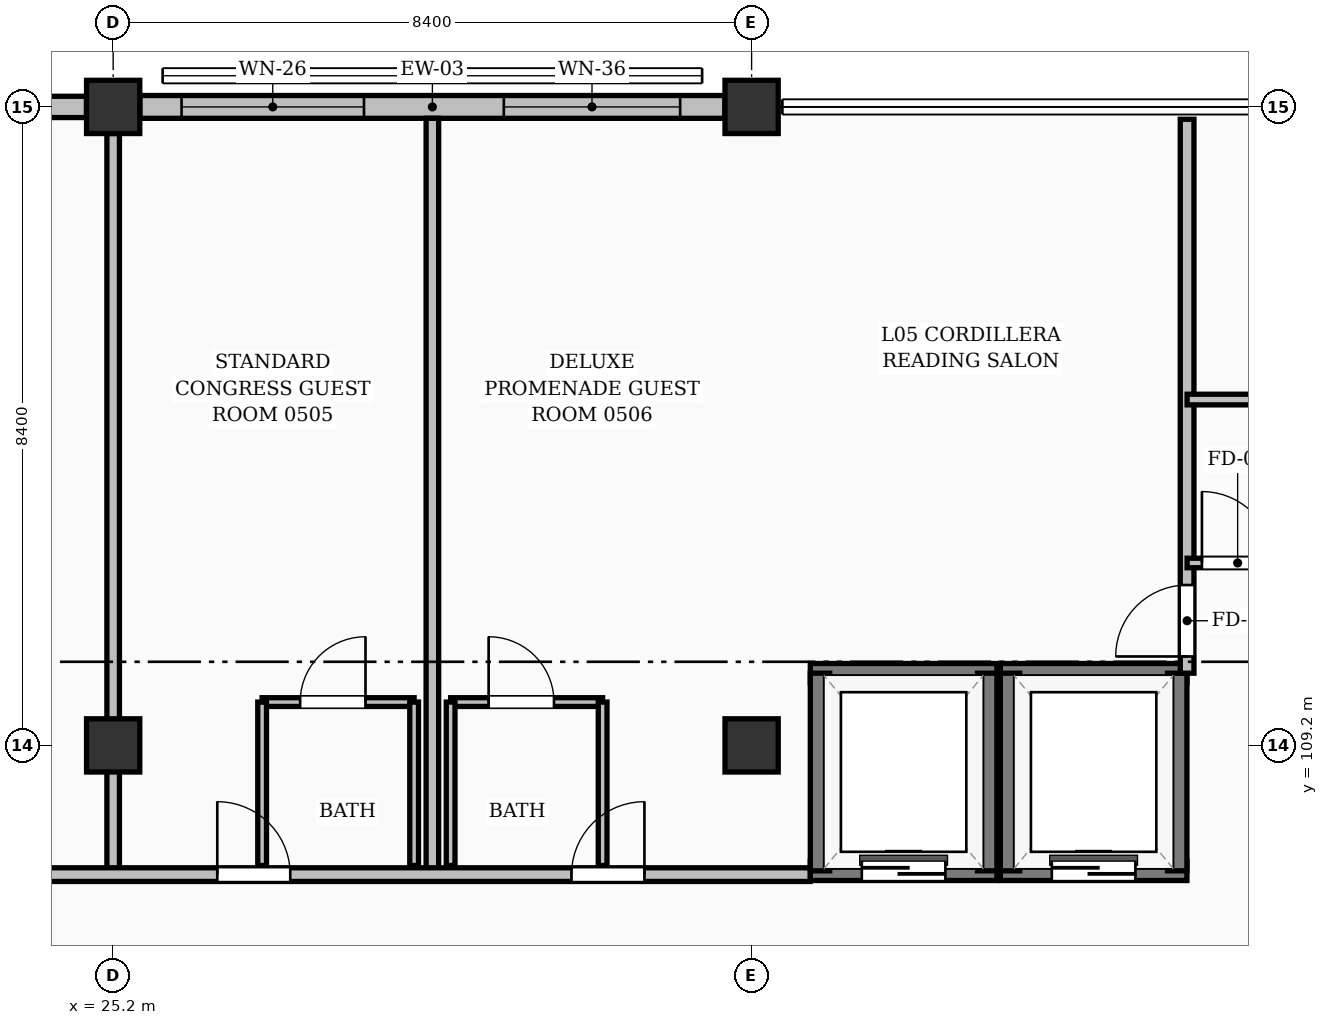
"""IFC4 building model, lengths in metres.
Left out: names, types, materials, properties, quantities, classifications, styles, units other than length and angle.
Written with IfcOpenShell. Run it as: python <this file> out.ifc"""

import sys

from ifc_helpers import new_model, si_unit, direction, frame, frame_2d, origin, origin_2d, place, context, subcontext, project, spatial, rectangle, extrude, element, fill, save


model = new_model("IFC4")
c1 = context("Model", 3, precision=1e-05, world=origin(), true_north=direction((0.0, 1.0)))
c2 = subcontext(c1, "Body", "Model", "MODEL_VIEW")
j1 = project(units=[si_unit("LENGTHUNIT", "METRE"), si_unit("PLANEANGLEUNIT", "RADIAN")], contexts=[c1])
p1 = place(None, origin())
s1 = spatial("IfcSite", under=j1, at=p1, CompositionType="ELEMENT")
p2 = place(p1, origin())
s2 = spatial("IfcBuilding", under=s1, at=p2, CompositionType="ELEMENT")
p3 = place(p2, frame((0.0, 0.0, 18.48)))
s3 = spatial("IfcBuildingStorey", under=s2, at=p3, CompositionType="ELEMENT", Elevation=18.48)
for number, where, z_axis, x_axis in (
    (1, (25.2, 109.2, 0.0), (0.0, 0.0, 1.0), (1.0, 0.0, 0.0)),
    (2, (25.2, 117.6, 0.0), (0.0, 0.0, 1.0), (1.0, 0.0, 0.0)),
    (3, (33.6, 109.2, 0.0), (0.0, 0.0, 1.0), (1.0, 0.0, 0.0)),
    (4, (33.6, 117.6, 0.0), (0.0, 0.0, 1.0), (1.0, 0.0, 0.0)),
):
    element("IfcColumn", number, at=place(p3, frame(where, z_axis=z_axis, x_axis=x_axis)), inside=s3, PredefinedType="COLUMN", context=c2, shape_type="SweptSolid", body=[
        extrude(rectangle(XDim=0.7, YDim=0.7, at=origin_2d()), origin(), (0.0, 0.0, 1.0), 3.36),
    ])
p4 = place(p3, frame((17.151, 117.6, 0.0), z_axis=(0.0, 0.0, 1.0), x_axis=(1.0, 0.0, 0.0)))
e5 = element("IfcWall", 5, at=p4, inside=s3, PredefinedType="SOLIDWALL", context=c2, shape_type="SweptSolid", body=[
    extrude(rectangle(XDim=7.698, YDim=0.28, at=frame_2d((3.849, 0.0))), origin(), (0.0, 0.0, 1.0), 2.494),
])
p5 = place(p4, frame((1.024, 0.0, 0.0)))
e6 = element("IfcOpeningElement", 6, at=p5, cuts=e5, PredefinedType="OPENING", context=c2, shape_type="SweptSolid", body=[
    extrude(rectangle(XDim=1.55, YDim=2.08, at=frame_2d((0.775, 1.04))), frame((0.0, 0.15, 0.0), z_axis=(0.0, -1.0, 0.0), x_axis=(1.0, 0.0, 0.0)), (0.0, 0.0, 1.0), 0.3),
])
p6 = place(p4, frame((4.649, 0.0, 0.25)))
e7 = element("IfcOpeningElement", 7, at=p6, cuts=e5, PredefinedType="OPENING", context=c2, shape_type="SweptSolid", body=[
    extrude(rectangle(XDim=2.3, YDim=1.75, at=frame_2d((1.15, 0.875))), frame((0.0, 0.15, 0.0), z_axis=(0.0, -1.0, 0.0), x_axis=(1.0, 0.0, 0.0)), (0.0, 0.0, 1.0), 0.3),
])
p7 = place(p3, frame((25.551, 117.6, 0.0), z_axis=(0.0, 0.0, 1.0), x_axis=(1.0, 0.0, 0.0)))
e8 = element("IfcWall", 8, at=p7, inside=s3, PredefinedType="SOLIDWALL", context=c2, shape_type="SweptSolid", body=[
    extrude(rectangle(XDim=7.698, YDim=0.3, at=frame_2d((3.849, 0.0))), origin(), (0.0, 0.0, 1.0), 2.494),
])
p8 = place(p7, frame((0.549, 0.0, 0.25)))
e9 = element("IfcOpeningElement", 9, at=p8, cuts=e8, PredefinedType="OPENING", context=c2, shape_type="SweptSolid", body=[
    extrude(rectangle(XDim=2.4, YDim=1.75, at=frame_2d((1.2, 0.875))), frame((0.0, 0.16, 0.0), z_axis=(0.0, -1.0, 0.0), x_axis=(1.0, 0.0, 0.0)), (0.0, 0.0, 1.0), 0.32),
])
p9 = place(p7, frame((4.789, 0.0, 0.25)))
e10 = element("IfcOpeningElement", 10, at=p9, cuts=e8, PredefinedType="OPENING", context=c2, shape_type="SweptSolid", body=[
    extrude(rectangle(XDim=2.32, YDim=1.9, at=frame_2d((1.16, 0.95))), frame((0.0, 0.16, 0.0), z_axis=(0.0, -1.0, 0.0), x_axis=(1.0, 0.0, 0.0)), (0.0, 0.0, 1.0), 0.32),
])
p10 = place(p3, frame((34.373, 107.55, 0.0), z_axis=(0.0, 0.0, 1.0), x_axis=(1.0, 0.0, 0.0)))
e11 = element("IfcWall", 11, at=p10, inside=s3, PredefinedType="SOLIDWALL", context=c2, shape_type="SweptSolid", body=[
    extrude(rectangle(XDim=2.455, YDim=0.255, at=frame_2d((1.228, 0.0))), origin(), (0.0, 0.0, 1.0), 3.12),
])
p11 = place(p10, frame((0.677, 0.0, 0.0)))
e12 = element("IfcOpeningElement", 12, at=p11, cuts=e11, PredefinedType="OPENING", context=c2, shape_type="SweptSolid", body=[
    extrude(rectangle(XDim=1.1, YDim=2.15, at=frame_2d((0.55, 1.075))), frame((0.0, 0.137, 0.0), z_axis=(0.0, -1.0, 0.0), x_axis=(1.0, 0.0, 0.0)), (0.0, 0.0, 1.0), 0.275),
])
p12 = place(p3, frame((34.373, 110.15, 0.0), z_axis=(0.0, 0.0, 1.0), x_axis=(1.0, 0.0, 0.0)))
e13 = element("IfcWall", 13, at=p12, inside=s3, PredefinedType="SOLIDWALL", context=c2, shape_type="SweptSolid", body=[
    extrude(rectangle(XDim=2.455, YDim=0.255, at=frame_2d((1.228, 0.0))), origin(), (0.0, 0.0, 1.0), 3.12),
])
for number, where, z_axis, x_axis in (
    (14, (34.5, 107.55, 0.0), (0.0, 0.0, 1.0), (0.0, 1.0, 0.0)),
    (15, (36.7, 107.55, 0.0), (0.0, 0.0, 1.0), (0.0, 1.0, 0.0)),
):
    element("IfcWall", number, at=place(p3, frame(where, z_axis=z_axis, x_axis=x_axis)), inside=s3, PredefinedType="SOLIDWALL", context=c2, shape_type="SweptSolid", body=[
        extrude(rectangle(XDim=2.6, YDim=0.255, at=frame_2d((1.3, 0.0))), origin(), (0.0, 0.0, 1.0), 3.12),
    ])
p13 = place(p3, frame((36.873, 107.55, 0.0), z_axis=(0.0, 0.0, 1.0), x_axis=(1.0, 0.0, 0.0)))
e16 = element("IfcWall", 16, at=p13, inside=s3, PredefinedType="SOLIDWALL", context=c2, shape_type="SweptSolid", body=[
    extrude(rectangle(XDim=2.455, YDim=0.255, at=frame_2d((1.228, 0.0))), origin(), (0.0, 0.0, 1.0), 3.12),
])
p14 = place(p13, frame((0.677, 0.0, 0.0)))
e17 = element("IfcOpeningElement", 17, at=p14, cuts=e16, PredefinedType="OPENING", context=c2, shape_type="SweptSolid", body=[
    extrude(rectangle(XDim=1.1, YDim=2.15, at=frame_2d((0.55, 1.075))), frame((0.0, 0.137, 0.0), z_axis=(0.0, -1.0, 0.0), x_axis=(1.0, 0.0, 0.0)), (0.0, 0.0, 1.0), 0.275),
])
p15 = place(p3, frame((36.873, 110.15, 0.0), z_axis=(0.0, 0.0, 1.0), x_axis=(1.0, 0.0, 0.0)))
e18 = element("IfcWall", 18, at=p15, inside=s3, PredefinedType="SOLIDWALL", context=c2, shape_type="SweptSolid", body=[
    extrude(rectangle(XDim=2.455, YDim=0.255, at=frame_2d((1.228, 0.0))), origin(), (0.0, 0.0, 1.0), 3.12),
])
for number, where, z_axis, x_axis in (
    (19, (37.0, 107.55, 0.0), (0.0, 0.0, 1.0), (0.0, 1.0, 0.0)),
    (20, (39.2, 107.55, 0.0), (0.0, 0.0, 1.0), (0.0, 1.0, 0.0)),
):
    element("IfcWall", number, at=place(p3, frame(where, z_axis=z_axis, x_axis=x_axis)), inside=s3, PredefinedType="SOLIDWALL", context=c2, shape_type="SweptSolid", body=[
        extrude(rectangle(XDim=2.6, YDim=0.255, at=frame_2d((1.3, 0.0))), origin(), (0.0, 0.0, 1.0), 3.12),
    ])
p16 = place(p3, frame((27.16, 109.77, 0.0), z_axis=(0.0, 0.0, 1.0), x_axis=(1.0, 0.0, 0.0)))
e21 = element("IfcWall", 21, at=p16, inside=s3, PredefinedType="PARTITIONING", context=c2, shape_type="SweptSolid", body=[
    extrude(rectangle(XDim=2.0, YDim=0.115, at=frame_2d((1.0, 0.0))), origin(), (0.0, 0.0, 1.0), 3.12),
])
p17 = place(p16, frame((0.5, 0.0, 0.0)))
e22 = element("IfcOpeningElement", 22, at=p17, cuts=e21, PredefinedType="OPENING", context=c2, shape_type="SweptSolid", body=[
    extrude(rectangle(XDim=0.86, YDim=2.05, at=frame_2d((0.43, 1.025))), frame((0.0, 0.067, 0.0), z_axis=(0.0, -1.0, 0.0), x_axis=(1.0, 0.0, 0.0)), (0.0, 0.0, 1.0), 0.135),
])
p18 = place(p3, frame((27.16, 107.62, 0.0), z_axis=(0.0, 0.0, 1.0), x_axis=(0.0, 1.0, 0.0)))
e23 = element("IfcWall", 23, at=p18, inside=s3, PredefinedType="PARTITIONING", context=c2, shape_type="SweptSolid", body=[
    extrude(rectangle(XDim=2.15, YDim=0.115, at=frame_2d((1.075, 0.0))), origin(), (0.0, 0.0, 1.0), 2.642),
])
p19 = place(p3, frame((29.16, 107.62, 0.0), z_axis=(0.0, 0.0, 1.0), x_axis=(0.0, 1.0, 0.0)))
e24 = element("IfcWall", 24, at=p19, inside=s3, PredefinedType="PARTITIONING", context=c2, shape_type="SweptSolid", body=[
    extrude(rectangle(XDim=2.15, YDim=0.115, at=frame_2d((1.075, 0.0))), origin(), (0.0, 0.0, 1.0), 3.12),
])
p20 = place(p3, frame((29.64, 109.77, 0.0), z_axis=(0.0, 0.0, 1.0), x_axis=(1.0, 0.0, 0.0)))
e25 = element("IfcWall", 25, at=p20, inside=s3, PredefinedType="PARTITIONING", context=c2, shape_type="SweptSolid", body=[
    extrude(rectangle(XDim=2.0, YDim=0.115, at=frame_2d((1.0, 0.0))), origin(), (0.0, 0.0, 1.0), 3.12),
])
p21 = place(p20, frame((0.5, 0.0, 0.0)))
e26 = element("IfcOpeningElement", 26, at=p21, cuts=e25, PredefinedType="OPENING", context=c2, shape_type="SweptSolid", body=[
    extrude(rectangle(XDim=0.86, YDim=2.05, at=frame_2d((0.43, 1.025))), frame((0.0, 0.067, 0.0), z_axis=(0.0, -1.0, 0.0), x_axis=(1.0, 0.0, 0.0)), (0.0, 0.0, 1.0), 0.135),
])
p22 = place(p3, frame((29.64, 107.62, 0.0), z_axis=(0.0, 0.0, 1.0), x_axis=(0.0, 1.0, 0.0)))
e27 = element("IfcWall", 27, at=p22, inside=s3, PredefinedType="PARTITIONING", context=c2, shape_type="SweptSolid", body=[
    extrude(rectangle(XDim=2.15, YDim=0.115, at=frame_2d((1.075, 0.0))), origin(), (0.0, 0.0, 1.0), 3.12),
])
p23 = place(p3, frame((31.64, 107.62, 0.0), z_axis=(0.0, 0.0, 1.0), x_axis=(0.0, 1.0, 0.0)))
e28 = element("IfcWall", 28, at=p23, inside=s3, PredefinedType="PARTITIONING", context=c2, shape_type="SweptSolid", body=[
    extrude(rectangle(XDim=2.15, YDim=0.115, at=frame_2d((1.075, 0.0))), origin(), (0.0, 0.0, 1.0), 2.642),
])
p24 = place(p3, frame((29.4, 107.5, 0.0), z_axis=(0.0, 0.0, 1.0), x_axis=(0.0, 1.0, 0.0)))
e29 = element("IfcWall", 29, at=p24, inside=s3, PredefinedType="PARTITIONING", context=c2, shape_type="SweptSolid", body=[
    extrude(rectangle(XDim=9.95, YDim=0.165, at=frame_2d((4.975, 0.0))), origin(), (0.0, 0.0, 1.0), 3.12),
])
p25 = place(p3, frame((25.2, 107.5, 0.0), z_axis=(0.0, 0.0, 1.0), x_axis=(0.0, 1.0, 0.0)))
e30 = element("IfcWall", 30, at=p25, inside=s3, PredefinedType="PARTITIONING", context=c2, shape_type="SweptSolid", body=[
    extrude(rectangle(XDim=9.75, YDim=0.165, at=frame_2d((4.875, 0.0))), origin(), (0.0, 0.0, 1.0), 2.455),
])
p26 = place(p3, frame((0.13, 107.5, 0.0), z_axis=(0.0, 0.0, 1.0), x_axis=(1.0, 0.0, 0.0)))
e31 = element("IfcWall", 31, at=p26, inside=s3, PredefinedType="PARTITIONING", context=c2, shape_type="SweptSolid", body=[
    extrude(rectangle(XDim=34.24, YDim=0.18, at=frame_2d((17.12, 0.0))), origin(), (0.0, 0.0, 1.0), 3.12),
])
p27 = place(p26, frame((1.37, 0.0, 0.0)))
e32 = element("IfcOpeningElement", 32, at=p27, cuts=e31, PredefinedType="OPENING", context=c2, shape_type="SweptSolid", body=[
    extrude(rectangle(XDim=1.02, YDim=2.15, at=frame_2d((0.51, 1.075))), frame((0.0, 0.1, 0.0), z_axis=(0.0, -1.0, 0.0), x_axis=(1.0, 0.0, 0.0)), (0.0, 0.0, 1.0), 0.2),
])
p28 = place(p26, frame((9.64, 0.0, 0.0)))
e33 = element("IfcOpeningElement", 33, at=p28, cuts=e31, PredefinedType="OPENING", context=c2, shape_type="SweptSolid", body=[
    extrude(rectangle(XDim=0.96, YDim=2.15, at=frame_2d((0.48, 1.075))), frame((0.0, 0.1, 0.0), z_axis=(0.0, -1.0, 0.0), x_axis=(1.0, 0.0, 0.0)), (0.0, 0.0, 1.0), 0.2),
])
p29 = place(p26, frame((14.3, 0.0, 0.0)))
e34 = element("IfcOpeningElement", 34, at=p29, cuts=e31, PredefinedType="OPENING", context=c2, shape_type="SweptSolid", body=[
    extrude(rectangle(XDim=0.96, YDim=2.15, at=frame_2d((0.48, 1.075))), frame((0.0, 0.1, 0.0), z_axis=(0.0, -1.0, 0.0), x_axis=(1.0, 0.0, 0.0)), (0.0, 0.0, 1.0), 0.2),
])
p30 = place(p26, frame((18.17, 0.0, 0.0)))
e35 = element("IfcOpeningElement", 35, at=p30, cuts=e31, PredefinedType="OPENING", context=c2, shape_type="SweptSolid", body=[
    extrude(rectangle(XDim=1.02, YDim=2.15, at=frame_2d((0.51, 1.075))), frame((0.0, 0.1, 0.0), z_axis=(0.0, -1.0, 0.0), x_axis=(1.0, 0.0, 0.0)), (0.0, 0.0, 1.0), 0.2),
])
p31 = place(p26, frame((26.44, 0.0, 0.0)))
e36 = element("IfcOpeningElement", 36, at=p31, cuts=e31, PredefinedType="OPENING", context=c2, shape_type="SweptSolid", body=[
    extrude(rectangle(XDim=0.96, YDim=2.15, at=frame_2d((0.48, 1.075))), frame((0.0, 0.1, 0.0), z_axis=(0.0, -1.0, 0.0), x_axis=(1.0, 0.0, 0.0)), (0.0, 0.0, 1.0), 0.2),
])
p32 = place(p26, frame((31.1, 0.0, 0.0)))
e37 = element("IfcOpeningElement", 37, at=p32, cuts=e31, PredefinedType="OPENING", context=c2, shape_type="SweptSolid", body=[
    extrude(rectangle(XDim=0.96, YDim=2.15, at=frame_2d((0.48, 1.075))), frame((0.0, 0.1, 0.0), z_axis=(0.0, -1.0, 0.0), x_axis=(1.0, 0.0, 0.0)), (0.0, 0.0, 1.0), 0.2),
])
p33 = place(p3, frame((39.33, 110.15, 0.0), z_axis=(0.0, 0.0, 1.0), x_axis=(0.0, 1.0, 0.0)))
e38 = element("IfcWall", 38, at=p33, inside=s3, PredefinedType="PARTITIONING", context=c2, shape_type="SweptSolid", body=[
    extrude(rectangle(XDim=7.288, YDim=0.18, at=frame_2d((3.644, 0.0))), origin(), (0.0, 0.0, 1.0), 3.12),
])
p34 = place(p33, frame((0.22, 0.0, 0.0)))
e39 = element("IfcOpeningElement", 39, at=p34, cuts=e38, PredefinedType="OPENING", context=c2, shape_type="SweptSolid", body=[
    extrude(rectangle(XDim=0.94, YDim=2.1, at=frame_2d((0.47, 1.05))), frame((0.0, 0.1, 0.0), z_axis=(0.0, -1.0, 0.0), x_axis=(1.0, 0.0, 0.0)), (0.0, 0.0, 1.0), 0.2),
])
p35 = place(p3, frame((39.33, 111.6, 0.0), z_axis=(0.0, 0.0, 1.0), x_axis=(1.0, 0.0, 0.0)))
e40 = element("IfcWall", 40, at=p35, inside=s3, PredefinedType="PARTITIONING", context=c2, shape_type="SweptSolid", body=[
    extrude(rectangle(XDim=1.33, YDim=0.125, at=frame_2d((0.665, 0.0))), origin(), (0.0, 0.0, 1.0), 3.12),
])
p36 = place(p35, frame((0.195, 0.0, 0.0)))
e41 = element("IfcOpeningElement", 41, at=p36, cuts=e40, PredefinedType="OPENING", context=c2, shape_type="SweptSolid", body=[
    extrude(rectangle(XDim=0.94, YDim=2.1, at=frame_2d((0.47, 1.05))), frame((0.0, 0.073, 0.0), z_axis=(0.0, -1.0, 0.0), x_axis=(1.0, 0.0, 0.0)), (0.0, 0.0, 1.0), 0.145),
])
p37 = place(p3, frame((39.33, 113.75, 0.0), z_axis=(0.0, 0.0, 1.0), x_axis=(1.0, 0.0, 0.0)))
e42 = element("IfcWall", 42, at=p37, inside=s3, PredefinedType="PARTITIONING", context=c2, shape_type="SweptSolid", body=[
    extrude(rectangle(XDim=2.67, YDim=0.14, at=frame_2d((1.335, 0.0))), origin(), (0.0, 0.0, 1.0), 3.12),
])
p38 = place(p8, origin())
e43 = element("IfcWindow", 43, at=p38, inside=s3, PartitioningType="DOUBLE_PANEL_VERTICAL", PredefinedType="WINDOW", context=c2, shape_type="SweptSolid", body=[
    extrude(rectangle(XDim=2.4, YDim=1.75, at=frame_2d((1.2, 0.875))), frame((0.0, 0.03, 0.0), z_axis=(0.0, -1.0, 0.0), x_axis=(1.0, 0.0, 0.0)), (0.0, 0.0, 1.0), 0.06),
])
fill(e9, e43)
p39 = place(p9, origin())
e44 = element("IfcWindow", 44, at=p39, inside=s3, PartitioningType="DOUBLE_PANEL_VERTICAL", PredefinedType="WINDOW", context=c2, shape_type="SweptSolid", body=[
    extrude(rectangle(XDim=2.32, YDim=1.9, at=frame_2d((1.16, 0.95))), frame((0.0, 0.03, 0.0), z_axis=(0.0, -1.0, 0.0), x_axis=(1.0, 0.0, 0.0)), (0.0, 0.0, 1.0), 0.06),
])
fill(e10, e44)
p40 = place(p11, origin())
e45 = element("IfcDoor", 45, at=p40, inside=s3, OperationType="DOUBLE_DOOR_SLIDING", PredefinedType="DOOR", context=c2, shape_type="SweptSolid", body=[
    extrude(rectangle(XDim=1.1, YDim=2.15, at=frame_2d((0.55, 1.075))), frame((0.0, 0.025, 0.0), z_axis=(0.0, -1.0, 0.0), x_axis=(1.0, 0.0, 0.0)), (0.0, 0.0, 1.0), 0.05),
])
fill(e12, e45)
p41 = place(p14, origin())
e46 = element("IfcDoor", 46, at=p41, inside=s3, OperationType="DOUBLE_DOOR_SLIDING", PredefinedType="DOOR", context=c2, shape_type="SweptSolid", body=[
    extrude(rectangle(XDim=1.1, YDim=2.15, at=frame_2d((0.55, 1.075))), frame((0.0, 0.025, 0.0), z_axis=(0.0, -1.0, 0.0), x_axis=(1.0, 0.0, 0.0)), (0.0, 0.0, 1.0), 0.05),
])
fill(e17, e46)
p42 = place(p17, origin())
e47 = element("IfcDoor", 47, at=p42, inside=s3, OperationType="SINGLE_SWING_RIGHT", PredefinedType="DOOR", context=c2, shape_type="SweptSolid", body=[
    extrude(rectangle(XDim=0.86, YDim=2.05, at=frame_2d((0.43, 1.025))), frame((0.0, 0.025, 0.0), z_axis=(0.0, -1.0, 0.0), x_axis=(1.0, 0.0, 0.0)), (0.0, 0.0, 1.0), 0.05),
])
fill(e22, e47)
p43 = place(p21, origin())
e48 = element("IfcDoor", 48, at=p43, inside=s3, OperationType="SINGLE_SWING_LEFT", PredefinedType="DOOR", context=c2, shape_type="SweptSolid", body=[
    extrude(rectangle(XDim=0.86, YDim=2.05, at=frame_2d((0.43, 1.025))), frame((0.0, 0.025, 0.0), z_axis=(0.0, -1.0, 0.0), x_axis=(1.0, 0.0, 0.0)), (0.0, 0.0, 1.0), 0.05),
])
fill(e26, e48)
p44 = place(p31, origin())
e49 = element("IfcDoor", 49, at=p44, inside=s3, OperationType="SINGLE_SWING_LEFT", PredefinedType="DOOR", context=c2, shape_type="SweptSolid", body=[
    extrude(rectangle(XDim=0.96, YDim=2.15, at=frame_2d((0.48, 1.075))), frame((0.0, 0.025, 0.0), z_axis=(0.0, -1.0, 0.0), x_axis=(1.0, 0.0, 0.0)), (0.0, 0.0, 1.0), 0.05),
])
fill(e36, e49)
p45 = place(p32, origin())
e50 = element("IfcDoor", 50, at=p45, inside=s3, OperationType="SINGLE_SWING_RIGHT", PredefinedType="DOOR", context=c2, shape_type="SweptSolid", body=[
    extrude(rectangle(XDim=0.96, YDim=2.15, at=frame_2d((0.48, 1.075))), frame((0.0, 0.025, 0.0), z_axis=(0.0, -1.0, 0.0), x_axis=(1.0, 0.0, 0.0)), (0.0, 0.0, 1.0), 0.05),
])
fill(e37, e50)
p46 = place(p34, origin())
e51 = element("IfcDoor", 51, at=p46, inside=s3, OperationType="SINGLE_SWING_LEFT", PredefinedType="DOOR", context=c2, shape_type="SweptSolid", body=[
    extrude(rectangle(XDim=0.94, YDim=2.1, at=frame_2d((0.47, 1.05))), frame((0.0, 0.025, 0.0), z_axis=(0.0, -1.0, 0.0), x_axis=(1.0, 0.0, 0.0)), (0.0, 0.0, 1.0), 0.05),
])
fill(e39, e51)
p47 = place(p36, origin())
e52 = element("IfcDoor", 52, at=p47, inside=s3, OperationType="SINGLE_SWING_LEFT", PredefinedType="DOOR", context=c2, shape_type="SweptSolid", body=[
    extrude(rectangle(XDim=0.94, YDim=2.1, at=frame_2d((0.47, 1.05))), frame((0.0, 0.025, 0.0), z_axis=(0.0, -1.0, 0.0), x_axis=(1.0, 0.0, 0.0)), (0.0, 0.0, 1.0), 0.05),
])
fill(e41, e52)
save(model, sys.argv[1])
